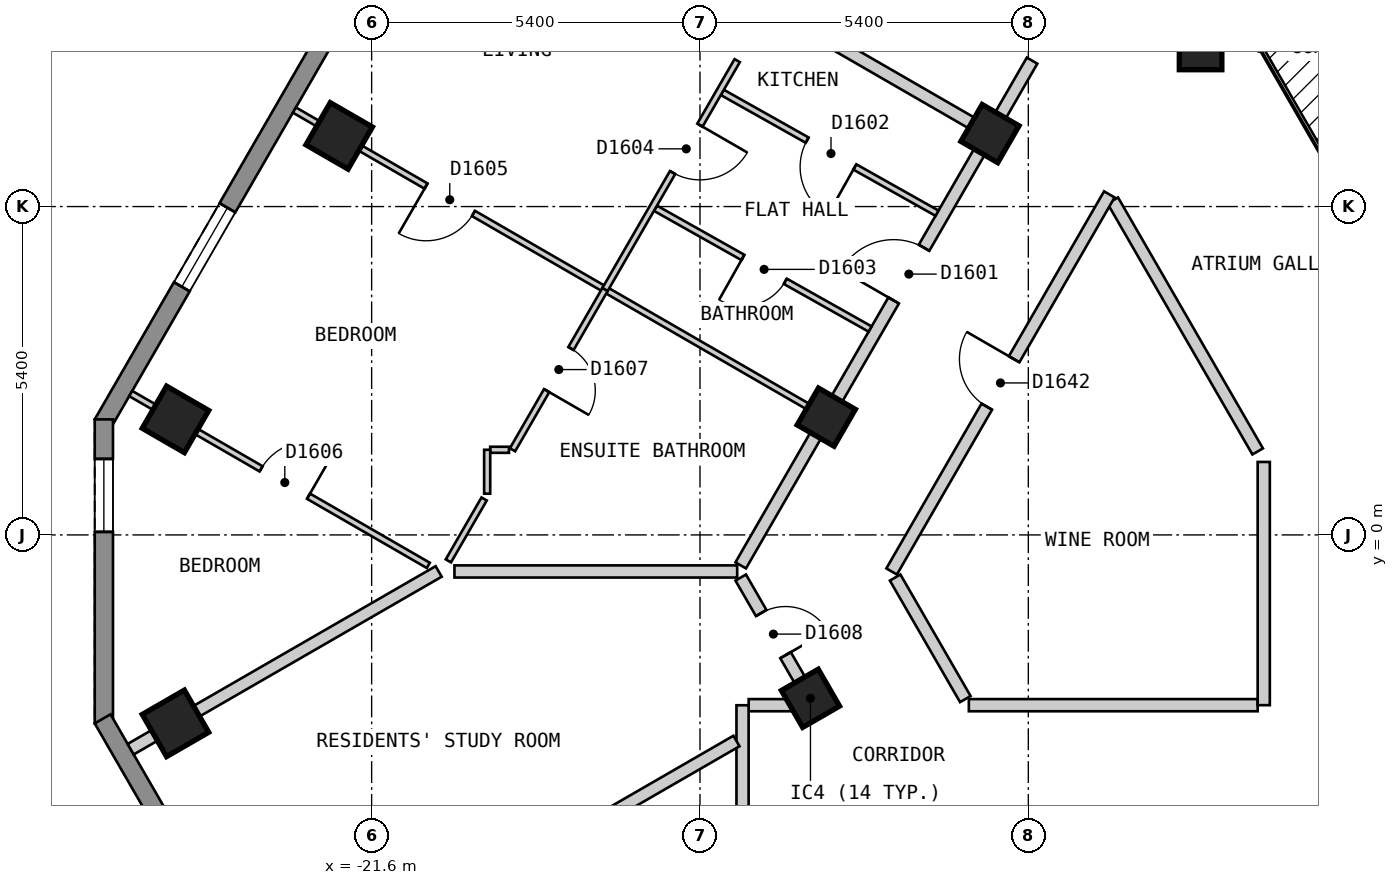
"""IFC4 building model, lengths in metres.
Left out: names, types, materials, properties, quantities, classifications, styles, units other than length and angle.
Written with IfcOpenShell. Run it as: python <this file> out.ifc"""

import sys

from ifc_helpers import new_model, si_unit, direction, frame, frame_2d, origin, origin_2d, place, context, subcontext, project, spatial, polyline, rectangle, outline, extrude, element, fill, save


model = new_model("IFC4")
c1 = context("Model", 3, precision=1e-05, world=origin(), true_north=direction((0.0, 1.0)))
c2 = subcontext(c1, "Body", "Model", "MODEL_VIEW")
j1 = project(units=[si_unit("LENGTHUNIT", "METRE"), si_unit("PLANEANGLEUNIT", "RADIAN")], contexts=[c1])
p1 = place(None, origin())
s1 = spatial("IfcSite", under=j1, at=p1, CompositionType="ELEMENT")
p2 = place(p1, origin())
s2 = spatial("IfcBuilding", under=s1, at=p2, CompositionType="ELEMENT")
p3 = place(p2, frame((0.0, 0.0, 169.2)))
s3 = spatial("IfcBuildingStorey", under=s2, at=p3, CompositionType="ELEMENT", Elevation=169.2)
for number, where, z_axis, x_axis in (
    (1, (-22.134, 6.562, 0.0), (0.0, 0.0, 1.0), (-0.5, -0.866, 0.0)),
    (2, (-24.826, 1.9, 0.0), (0.0, 0.0, 1.0), (-0.5, -0.866, 0.0)),
    (3, (-24.826, -3.099, 0.0), (0.0, 0.0, 1.0), (0.5, -0.866, 0.0)),
):
    element("IfcColumn", number, at=place(p3, frame(where, z_axis=z_axis, x_axis=x_axis)), inside=s3, PredefinedType="COLUMN", context=c2, shape_type="SweptSolid", body=[
        extrude(rectangle(XDim=0.8, YDim=0.8, at=origin_2d()), origin(), (0.0, 0.0, 1.0), 3.0),
    ])
for number, where, z_axis, x_axis in (
    (4, (-14.383, -2.687, 0.0), (0.0, 0.0, 1.0), (0.5, -0.866, 0.0)),
    (5, (-7.967, 8.0, 0.0), (0.0, 0.0, 1.0), (1.0, 0.0, 0.0)),
    (6, (-11.431, 6.6, 0.0), (0.0, 0.0, 1.0), (-0.5, -0.866, 0.0)),
    (7, (-14.123, 1.937, 0.0), (0.0, 0.0, 1.0), (-0.5, -0.866, 0.0)),
):
    element("IfcColumn", number, at=place(p3, frame(where, z_axis=z_axis, x_axis=x_axis)), inside=s3, PredefinedType="COLUMN", context=c2, shape_type="SweptSolid", body=[
        extrude(rectangle(XDim=0.7, YDim=0.7, at=origin_2d()), origin(), (0.0, 0.0, 1.0), 3.0),
    ])
p4 = place(p3, frame((-14.592, 21.625, 0.0), z_axis=(0.0, 0.0, 1.0), x_axis=(-0.500010537973, -0.866019319597, 0.0)))
e8 = element("IfcWall", 8, at=p4, inside=s3, PredefinedType="SOLIDWALL", context=c2, shape_type="SweptSolid", body=[
    extrude(outline(polyline([(0.0, -0.15), (22.863, -0.15), (22.783, 0.15), (0.08, 0.15), (0.0, -0.15)])), origin(), (0.0, 0.0, 1.0), 2.7),
])
p5 = place(p4, frame((2.606, 0.0, 0.15)))
e9 = element("IfcOpeningElement", 9, at=p5, cuts=e8, PredefinedType="OPENING", context=c2, shape_type="SweptSolid", body=[
    extrude(rectangle(XDim=1.5, YDim=2.1, at=frame_2d((0.75, 1.05))), frame((0.0, 0.16, 0.0), z_axis=(0.0, -1.0, 0.0), x_axis=(1.0, 0.0, 0.0)), (0.0, 0.0, 1.0), 0.32),
])
p6 = place(p4, frame((7.99, 0.0, 0.15)))
e10 = element("IfcOpeningElement", 10, at=p6, cuts=e8, PredefinedType="OPENING", context=c2, shape_type="SweptSolid", body=[
    extrude(rectangle(XDim=1.5, YDim=2.1, at=frame_2d((0.75, 1.05))), frame((0.0, 0.16, 0.0), z_axis=(0.0, -1.0, 0.0), x_axis=(1.0, 0.0, 0.0)), (0.0, 0.0, 1.0), 0.32),
])
p7 = place(p4, frame((13.373, 0.0, 0.15)))
e11 = element("IfcOpeningElement", 11, at=p7, cuts=e8, PredefinedType="OPENING", context=c2, shape_type="SweptSolid", body=[
    extrude(rectangle(XDim=1.5, YDim=2.1, at=frame_2d((0.75, 1.05))), frame((0.0, 0.16, 0.0), z_axis=(0.0, -1.0, 0.0), x_axis=(1.0, 0.0, 0.0)), (0.0, 0.0, 1.0), 0.32),
])
p8 = place(p4, frame((18.758, 0.0, 0.15)))
e12 = element("IfcOpeningElement", 12, at=p8, cuts=e8, PredefinedType="OPENING", context=c2, shape_type="SweptSolid", body=[
    extrude(rectangle(XDim=1.5, YDim=2.1, at=frame_2d((0.75, 1.05))), frame((0.0, 0.16, 0.0), z_axis=(0.0, -1.0, 0.0), x_axis=(1.0, 0.0, 0.0)), (0.0, 0.0, 1.0), 0.32),
])
p9 = place(p3, frame((-26.004, 1.9, 0.0), z_axis=(0.0, 0.0, 1.0), x_axis=(0.0, -1.0, 0.0)))
e13 = element("IfcWall", 13, at=p9, inside=s3, PredefinedType="SOLIDWALL", context=c2, shape_type="SweptSolid", body=[
    extrude(outline(polyline([(0.0, -0.15), (5.0, -0.15), (4.92, 0.15), (0.08, 0.15), (0.0, -0.15)])), origin(), (0.0, 0.0, 1.0), 2.7),
])
p10 = place(p9, frame((0.65, 0.0, 0.15)))
e14 = element("IfcOpeningElement", 14, at=p10, cuts=e13, PredefinedType="OPENING", context=c2, shape_type="SweptSolid", body=[
    extrude(rectangle(XDim=1.2, YDim=2.1, at=frame_2d((0.6, 1.05))), frame((0.0, 0.16, 0.0), z_axis=(0.0, -1.0, 0.0), x_axis=(1.0, 0.0, 0.0)), (0.0, 0.0, 1.0), 0.32),
])
p11 = place(p3, frame((-26.024, -3.025, 0.0), z_axis=(0.0, 0.0, 1.0), x_axis=(0.500018670445, -0.86601462413, 0.0)))
e15 = element("IfcWall", 15, at=p11, inside=s3, PredefinedType="SOLIDWALL", context=c2, shape_type="SweptSolid", body=[
    extrude(outline(polyline([(0.0, -0.15), (20.785, -0.15), (20.705, 0.15), (0.08, 0.15), (0.0, -0.15)])), origin(), (0.0, 0.0, 1.0), 2.7),
])
p12 = place(p11, frame((2.346, 0.0, 0.15)))
e16 = element("IfcOpeningElement", 16, at=p12, cuts=e15, PredefinedType="OPENING", context=c2, shape_type="SweptSolid", body=[
    extrude(rectangle(XDim=1.5, YDim=2.1, at=frame_2d((0.75, 1.05))), frame((0.0, 0.16, 0.0), z_axis=(0.0, -1.0, 0.0), x_axis=(1.0, 0.0, 0.0)), (0.0, 0.0, 1.0), 0.32),
])
p13 = place(p11, frame((7.21, 0.0, 0.15)))
e17 = element("IfcOpeningElement", 17, at=p13, cuts=e15, PredefinedType="OPENING", context=c2, shape_type="SweptSolid", body=[
    extrude(rectangle(XDim=1.5, YDim=2.1, at=frame_2d((0.75, 1.05))), frame((0.0, 0.16, 0.0), z_axis=(0.0, -1.0, 0.0), x_axis=(1.0, 0.0, 0.0)), (0.0, 0.0, 1.0), 0.32),
])
p14 = place(p11, frame((12.073, 0.0, 0.15)))
e18 = element("IfcOpeningElement", 18, at=p14, cuts=e15, PredefinedType="OPENING", context=c2, shape_type="SweptSolid", body=[
    extrude(rectangle(XDim=1.5, YDim=2.1, at=frame_2d((0.75, 1.05))), frame((0.0, 0.16, 0.0), z_axis=(0.0, -1.0, 0.0), x_axis=(1.0, 0.0, 0.0)), (0.0, 0.0, 1.0), 0.32),
])
p15 = place(p11, frame((16.938, 0.0, 0.15)))
e19 = element("IfcOpeningElement", 19, at=p15, cuts=e15, PredefinedType="OPENING", context=c2, shape_type="SweptSolid", body=[
    extrude(rectangle(XDim=1.5, YDim=2.1, at=frame_2d((0.75, 1.05))), frame((0.0, 0.16, 0.0), z_axis=(0.0, -1.0, 0.0), x_axis=(1.0, 0.0, 0.0)), (0.0, 0.0, 1.0), 0.32),
])
p16 = place(p3, frame((-9.411, 5.5, 0.0), z_axis=(0.0, 0.0, 1.0), x_axis=(0.500018099276, -0.86601495391, 0.0)))
e20 = element("IfcWall", 20, at=p16, inside=s3, PredefinedType="PARTITIONING", context=c2, shape_type="SweptSolid", body=[
    extrude(rectangle(XDim=4.765, YDim=0.2, at=frame_2d((2.383, 0.0))), origin(), (0.0, 0.0, 1.0), 2.7),
])
p17 = place(p3, frame((-12.99, -0.701, 0.0), z_axis=(0.0, 0.0, 1.0), x_axis=(0.499972710878, -0.866041158593, 0.0)))
e21 = element("IfcWall", 21, at=p17, inside=s3, PredefinedType="PARTITIONING", context=c2, shape_type="SweptSolid", body=[
    extrude(rectangle(XDim=2.308, YDim=0.2, at=frame_2d((1.154, 0.0))), origin(), (0.0, 0.0, 1.0), 2.7),
])
p18 = place(p3, frame((-15.53, -0.701, 0.0), z_axis=(0.0, 0.0, 1.0), x_axis=(0.499972710878, -0.866041158593, 0.0)))
e22 = element("IfcWall", 22, at=p18, inside=s3, PredefinedType="PARTITIONING", context=c2, shape_type="SweptSolid", body=[
    extrude(rectangle(XDim=2.308, YDim=0.2, at=frame_2d((1.154, 0.0))), origin(), (0.0, 0.0, 1.0), 2.7),
])
p19 = place(p18, frame((0.674, 0.0, 0.0)))
e23 = element("IfcOpeningElement", 23, at=p19, cuts=e22, PredefinedType="OPENING", context=c2, shape_type="SweptSolid", body=[
    extrude(rectangle(XDim=0.8, YDim=2.1, at=frame_2d((0.4, 1.05))), frame((0.0, 0.11, 0.0), z_axis=(0.0, -1.0, 0.0), x_axis=(1.0, 0.0, 0.0)), (0.0, 0.0, 1.0), 0.22),
])
p20 = place(p3, frame((-15.399, -2.8, 0.0), z_axis=(0.0, 0.0, 1.0), x_axis=(1.0, 0.0, 0.0)))
e24 = element("IfcWall", 24, at=p20, inside=s3, PredefinedType="PARTITIONING", context=c2, shape_type="SweptSolid", body=[
    extrude(rectangle(XDim=1.081, YDim=0.2, at=frame_2d((0.541, 0.0))), origin(), (0.0, 0.0, 1.0), 2.7),
])
p21 = place(p3, frame((-11.778, -2.8, 0.0), z_axis=(0.0, 0.0, 1.0), x_axis=(1.0, 0.0, 0.0)))
e25 = element("IfcWall", 25, at=p21, inside=s3, PredefinedType="PARTITIONING", context=c2, shape_type="SweptSolid", body=[
    extrude(rectangle(XDim=4.75, YDim=0.2, at=frame_2d((2.375, 0.0))), origin(), (0.0, 0.0, 1.0), 2.7),
])
p22 = place(p3, frame((-13.048, -0.601, 0.0), z_axis=(0.0, 0.0, 1.0), x_axis=(0.499982180423, 0.866035691677, 0.0)))
e26 = element("IfcWall", 26, at=p22, inside=s3, PredefinedType="PARTITIONING", context=c2, shape_type="SweptSolid", body=[
    extrude(rectangle(XDim=7.16, YDim=0.2, at=frame_2d((3.58, 0.0))), origin(), (0.0, 0.0, 1.0), 2.7),
])
p23 = place(p22, frame((3.13, 0.0, 0.0)))
e27 = element("IfcOpeningElement", 27, at=p23, cuts=e26, PredefinedType="OPENING", context=c2, shape_type="SweptSolid", body=[
    extrude(rectangle(XDim=0.9, YDim=2.1, at=frame_2d((0.45, 1.05))), frame((0.0, 0.11, 0.0), z_axis=(0.0, -1.0, 0.0), x_axis=(1.0, 0.0, 0.0)), (0.0, 0.0, 1.0), 0.22),
])
p24 = place(p3, frame((-15.53, -0.501, 0.0), z_axis=(0.0, 0.0, 1.0), x_axis=(0.499952498232, 0.866052827206, 0.0)))
e28 = element("IfcWall", 28, at=p24, inside=s3, PredefinedType="PARTITIONING", context=c2, shape_type="SweptSolid", body=[
    extrude(rectangle(XDim=9.585, YDim=0.2, at=frame_2d((4.792, 0.0))), origin(), (0.0, 0.0, 1.0), 2.7),
])
p25 = place(p24, frame((5.031, 0.0, 0.0)))
e29 = element("IfcOpeningElement", 29, at=p25, cuts=e28, PredefinedType="OPENING", context=c2, shape_type="SweptSolid", body=[
    extrude(rectangle(XDim=1.0, YDim=2.1, at=frame_2d((0.5, 1.05))), frame((0.0, 0.11, 0.0), z_axis=(0.0, -1.0, 0.0), x_axis=(1.0, 0.0, 0.0)), (0.0, 0.0, 1.0), 0.22),
])
p26 = place(p3, frame((-6.928, -2.8, 0.0), z_axis=(0.0, 0.0, 1.0), x_axis=(0.0, 1.0, 0.0)))
e30 = element("IfcWall", 30, at=p26, inside=s3, PredefinedType="PARTITIONING", context=c2, shape_type="SweptSolid", body=[
    extrude(rectangle(XDim=4.0, YDim=0.2, at=frame_2d((2.0, 0.0))), origin(), (0.0, 0.0, 1.0), 2.7),
])
p27 = place(p3, frame((-15.5, -6.6, 0.0), z_axis=(0.0, 0.0, 1.0), x_axis=(0.0, 1.0, 0.0)))
e31 = element("IfcWall", 31, at=p27, inside=s3, PredefinedType="PARTITIONING", context=c2, shape_type="SweptSolid", body=[
    extrude(rectangle(XDim=3.799, YDim=0.2, at=frame_2d((1.899, 0.0))), origin(), (0.0, 0.0, 1.0), 2.7),
])
p28 = place(p3, frame((-16.932, 5.372, 0.0), z_axis=(0.0, 0.0, 1.0), x_axis=(0.871514356952, -0.490369988505, 0.0)))
e32 = element("IfcWall", 32, at=p28, inside=s3, PredefinedType="PARTITIONING", context=c2, shape_type="SweptSolid", body=[
    extrude(rectangle(XDim=4.05, YDim=0.1, at=frame_2d((2.025, 0.0))), origin(), (0.0, 0.0, 1.0), 2.7),
])
p29 = place(p28, frame((1.65, 0.0, 0.0)))
e33 = element("IfcOpeningElement", 33, at=p29, cuts=e32, PredefinedType="OPENING", context=c2, shape_type="SweptSolid", body=[
    extrude(rectangle(XDim=0.8, YDim=2.1, at=frame_2d((0.4, 1.05))), frame((0.0, 0.06, 0.0), z_axis=(0.0, -1.0, 0.0), x_axis=(1.0, 0.0, 0.0)), (0.0, 0.0, 1.0), 0.12),
])
p30 = place(p3, frame((-15.832, 7.277, 0.0), z_axis=(0.0, 0.0, 1.0), x_axis=(0.871528850672, -0.490344228523, 0.0)))
e34 = element("IfcWall", 34, at=p30, inside=s3, PredefinedType="PARTITIONING", context=c2, shape_type="SweptSolid", body=[
    extrude(rectangle(XDim=4.05, YDim=0.1, at=frame_2d((2.025, 0.0))), origin(), (0.0, 0.0, 1.0), 2.7),
])
p31 = place(p30, frame((1.6, 0.0, 0.0)))
e35 = element("IfcOpeningElement", 35, at=p31, cuts=e34, PredefinedType="OPENING", context=c2, shape_type="SweptSolid", body=[
    extrude(rectangle(XDim=0.9, YDim=2.1, at=frame_2d((0.45, 1.05))), frame((0.0, 0.06, 0.0), z_axis=(0.0, -1.0, 0.0), x_axis=(1.0, 0.0, 0.0)), (0.0, 0.0, 1.0), 0.12),
])
p32 = place(p3, frame((-22.87, 6.987, 0.0), z_axis=(0.0, 0.0, 1.0), x_axis=(0.866022959057, -0.500004234368, 0.0)))
e36 = element("IfcWall", 36, at=p32, inside=s3, PredefinedType="PARTITIONING", context=c2, shape_type="SweptSolid", body=[
    extrude(rectangle(XDim=10.0, YDim=0.1, at=frame_2d((5.0, 0.0))), origin(), (0.0, 0.0, 1.0), 2.7),
])
p33 = place(p32, frame((2.5, 0.0, 0.0)))
e37 = element("IfcOpeningElement", 37, at=p33, cuts=e36, PredefinedType="OPENING", context=c2, shape_type="SweptSolid", body=[
    extrude(rectangle(XDim=0.9, YDim=2.1, at=frame_2d((0.45, 1.05))), frame((0.0, 0.06, 0.0), z_axis=(0.0, -1.0, 0.0), x_axis=(1.0, 0.0, 0.0)), (0.0, 0.0, 1.0), 0.12),
])
p34 = place(p3, frame((-25.562, 2.325, 0.0), z_axis=(0.0, 0.0, 1.0), x_axis=(0.865998530728, -0.500046542611, 0.0)))
e38 = element("IfcWall", 38, at=p34, inside=s3, PredefinedType="PARTITIONING", context=c2, shape_type="SweptSolid", body=[
    extrude(rectangle(XDim=5.651, YDim=0.1, at=frame_2d((2.826, 0.0))), origin(), (0.0, 0.0, 1.0), 2.7),
])
p35 = place(p34, frame((2.476, 0.0, 0.0)))
e39 = element("IfcOpeningElement", 39, at=p35, cuts=e38, PredefinedType="OPENING", context=c2, shape_type="SweptSolid", body=[
    extrude(rectangle(XDim=0.9, YDim=2.1, at=frame_2d((0.45, 1.05))), frame((0.0, 0.06, 0.0), z_axis=(0.0, -1.0, 0.0), x_axis=(1.0, 0.0, 0.0)), (0.0, 0.0, 1.0), 0.12),
])
p36 = place(p3, frame((-19.65, 1.4, 0.0), z_axis=(0.0, 0.0, 1.0), x_axis=(1.0, 0.0, 0.0)))
e40 = element("IfcWall", 40, at=p36, inside=s3, PredefinedType="PARTITIONING", context=c2, shape_type="SweptSolid", body=[
    extrude(rectangle(XDim=0.309, YDim=0.1, at=frame_2d((0.154, 0.0))), origin(), (0.0, 0.0, 1.0), 2.7),
])
p37 = place(p3, frame((-20.338, -0.427, 0.0), z_axis=(0.0, 0.0, 1.0), x_axis=(0.500069990121, 0.865984991198, 0.0)))
e41 = element("IfcWall", 41, at=p37, inside=s3, PredefinedType="PARTITIONING", context=c2, shape_type="SweptSolid", body=[
    extrude(rectangle(XDim=1.176, YDim=0.1, at=frame_2d((0.588, 0.0))), origin(), (0.0, 0.0, 1.0), 2.7),
])
p38 = place(p3, frame((-19.283, 1.4, 0.0), z_axis=(0.0, 0.0, 1.0), x_axis=(0.499847391584, 0.866113494368, 0.0)))
e42 = element("IfcWall", 42, at=p38, inside=s3, PredefinedType="PARTITIONING", context=c2, shape_type="SweptSolid", body=[
    extrude(rectangle(XDim=3.045, YDim=0.1, at=frame_2d((1.522, 0.0))), origin(), (0.0, 0.0, 1.0), 2.7),
])
p39 = place(p38, frame((1.123, 0.0, 0.0)))
e43 = element("IfcOpeningElement", 43, at=p39, cuts=e42, PredefinedType="OPENING", context=c2, shape_type="SweptSolid", body=[
    extrude(rectangle(XDim=0.8, YDim=2.1, at=frame_2d((0.4, 1.05))), frame((0.0, 0.06, 0.0), z_axis=(0.0, -1.0, 0.0), x_axis=(1.0, 0.0, 0.0)), (0.0, 0.0, 1.0), 0.12),
])
p40 = place(p3, frame((-19.7, 0.678, 0.0), z_axis=(0.0, 0.0, 1.0), x_axis=(0.0, 1.0, 0.0)))
e44 = element("IfcWall", 44, at=p40, inside=s3, PredefinedType="PARTITIONING", context=c2, shape_type="SweptSolid", body=[
    extrude(rectangle(XDim=0.722, YDim=0.1, at=frame_2d((0.361, 0.0))), origin(), (0.0, 0.0, 1.0), 2.7),
])
p41 = place(p3, frame((-20.178, 11.65, 0.0), z_axis=(0.0, 0.0, 1.0), x_axis=(0.866016855193, -0.500014806302, 0.0)))
e45 = element("IfcWall", 45, at=p41, inside=s3, PredefinedType="PARTITIONING", context=c2, shape_type="SweptSolid", body=[
    extrude(rectangle(XDim=10.0, YDim=0.2, at=frame_2d((5.0, 0.0))), origin(), (0.0, 0.0, 1.0), 2.7),
])
p42 = place(p3, frame((-20.238, -0.601, 0.0), z_axis=(0.0, 0.0, 1.0), x_axis=(1.0, 0.0, 0.0)))
e46 = element("IfcWall", 46, at=p42, inside=s3, PredefinedType="PARTITIONING", context=c2, shape_type="SweptSolid", body=[
    extrude(rectangle(XDim=4.65, YDim=0.2, at=frame_2d((2.325, 0.0))), origin(), (0.0, 0.0, 1.0), 2.7),
])
p43 = place(p3, frame((-23.13, -7.737, 0.0), z_axis=(0.0, 0.0, 1.0), x_axis=(0.86598451299, 0.500070818246, 0.0)))
e47 = element("IfcWall", 47, at=p43, inside=s3, PredefinedType="PARTITIONING", context=c2, shape_type="SweptSolid", body=[
    extrude(rectangle(XDim=8.695, YDim=0.2, at=frame_2d((4.348, 0.0))), origin(), (0.0, 0.0, 1.0), 2.7),
])
p44 = place(p3, frame((-25.563, -3.524, 0.0), z_axis=(0.0, 0.0, 1.0), x_axis=(0.866128586522, 0.499821239653, 0.0)))
e48 = element("IfcWall", 48, at=p44, inside=s3, PredefinedType="PARTITIONING", context=c2, shape_type="SweptSolid", body=[
    extrude(rectangle(XDim=5.848, YDim=0.2, at=frame_2d((2.924, 0.0))), origin(), (0.0, 0.0, 1.0), 2.7),
])
p45 = place(p3, frame((-17.761, 4.037, 0.0), z_axis=(0.0, 0.0, 1.0), x_axis=(0.50009692756, 0.865969435399, 0.0)))
e49 = element("IfcWall", 49, at=p45, inside=s3, PredefinedType="PARTITIONING", context=c2, shape_type="SweptSolid", body=[
    extrude(rectangle(XDim=4.345, YDim=0.1, at=frame_2d((2.173, 0.0))), origin(), (0.0, 0.0, 1.0), 2.7),
])
p46 = place(p45, frame((2.22, 0.0, 0.0)))
e50 = element("IfcOpeningElement", 50, at=p46, cuts=e49, PredefinedType="OPENING", context=c2, shape_type="SweptSolid", body=[
    extrude(rectangle(XDim=0.9, YDim=2.1, at=frame_2d((0.45, 1.05))), frame((0.0, 0.06, 0.0), z_axis=(0.0, -1.0, 0.0), x_axis=(1.0, 0.0, 0.0)), (0.0, 0.0, 1.0), 0.12),
])
p47 = place(p8, origin())
e51 = element("IfcWindow", 51, at=p47, inside=s3, PartitioningType="SINGLE_PANEL", PredefinedType="WINDOW", context=c2, shape_type="SweptSolid", body=[
    extrude(rectangle(XDim=1.5, YDim=2.1, at=frame_2d((0.75, 1.05))), frame((0.0, 0.03, 0.0), z_axis=(0.0, -1.0, 0.0), x_axis=(1.0, 0.0, 0.0)), (0.0, 0.0, 1.0), 0.06),
])
fill(e12, e51)
p48 = place(p10, origin())
e52 = element("IfcWindow", 52, at=p48, inside=s3, PartitioningType="SINGLE_PANEL", PredefinedType="WINDOW", context=c2, shape_type="SweptSolid", body=[
    extrude(rectangle(XDim=1.2, YDim=2.1, at=frame_2d((0.6, 1.05))), frame((0.0, 0.03, 0.0), z_axis=(0.0, -1.0, 0.0), x_axis=(1.0, 0.0, 0.0)), (0.0, 0.0, 1.0), 0.06),
])
fill(e14, e52)
p49 = place(p25, origin())
e53 = element("IfcDoor", 53, at=p49, inside=s3, OperationType="SINGLE_SWING_LEFT", PredefinedType="DOOR", context=c2, shape_type="SweptSolid", body=[
    extrude(rectangle(XDim=1.0, YDim=2.1, at=frame_2d((0.5, 1.05))), frame((0.0, 0.025, 0.0), z_axis=(0.0, -1.0, 0.0), x_axis=(1.0, 0.0, 0.0)), (0.0, 0.0, 1.0), 0.05),
])
fill(e29, e53)
p50 = place(p31, origin())
e54 = element("IfcDoor", 54, at=p50, inside=s3, OperationType="SINGLE_SWING_RIGHT", PredefinedType="DOOR", context=c2, shape_type="SweptSolid", body=[
    extrude(rectangle(XDim=0.9, YDim=2.1, at=frame_2d((0.45, 1.05))), frame((0.0, 0.025, 0.0), z_axis=(0.0, -1.0, 0.0), x_axis=(1.0, 0.0, 0.0)), (0.0, 0.0, 1.0), 0.05),
])
fill(e35, e54)
p51 = place(p29, origin())
e55 = element("IfcDoor", 55, at=p51, inside=s3, OperationType="SINGLE_SWING_LEFT", PredefinedType="DOOR", context=c2, shape_type="SweptSolid", body=[
    extrude(rectangle(XDim=0.8, YDim=2.1, at=frame_2d((0.4, 1.05))), frame((0.0, 0.025, 0.0), z_axis=(0.0, -1.0, 0.0), x_axis=(1.0, 0.0, 0.0)), (0.0, 0.0, 1.0), 0.05),
])
fill(e33, e55)
p52 = place(p46, origin())
e56 = element("IfcDoor", 56, at=p52, inside=s3, OperationType="SINGLE_SWING_RIGHT", PredefinedType="DOOR", context=c2, shape_type="SweptSolid", body=[
    extrude(rectangle(XDim=0.9, YDim=2.1, at=frame_2d((0.45, 1.05))), frame((0.0, 0.025, 0.0), z_axis=(0.0, -1.0, 0.0), x_axis=(1.0, 0.0, 0.0)), (0.0, 0.0, 1.0), 0.05),
])
fill(e50, e56)
p53 = place(p33, origin())
e57 = element("IfcDoor", 57, at=p53, inside=s3, OperationType="SINGLE_SWING_LEFT", PredefinedType="DOOR", context=c2, shape_type="SweptSolid", body=[
    extrude(rectangle(XDim=0.9, YDim=2.1, at=frame_2d((0.45, 1.05))), frame((0.0, 0.025, 0.0), z_axis=(0.0, -1.0, 0.0), x_axis=(1.0, 0.0, 0.0)), (0.0, 0.0, 1.0), 0.05),
])
fill(e37, e57)
p54 = place(p35, origin())
e58 = element("IfcDoor", 58, at=p54, inside=s3, OperationType="SINGLE_SWING_RIGHT", PredefinedType="DOOR", context=c2, shape_type="SweptSolid", body=[
    extrude(rectangle(XDim=0.9, YDim=2.1, at=frame_2d((0.45, 1.05))), frame((0.0, 0.025, 0.0), z_axis=(0.0, -1.0, 0.0), x_axis=(1.0, 0.0, 0.0)), (0.0, 0.0, 1.0), 0.05),
])
fill(e39, e58)
p55 = place(p39, origin())
e59 = element("IfcDoor", 59, at=p55, inside=s3, OperationType="SINGLE_SWING_LEFT", PredefinedType="DOOR", context=c2, shape_type="SweptSolid", body=[
    extrude(rectangle(XDim=0.8, YDim=2.1, at=frame_2d((0.4, 1.05))), frame((0.0, 0.025, 0.0), z_axis=(0.0, -1.0, 0.0), x_axis=(1.0, 0.0, 0.0)), (0.0, 0.0, 1.0), 0.05),
])
fill(e43, e59)
p56 = place(p19, origin())
e60 = element("IfcDoor", 60, at=p56, inside=s3, OperationType="SINGLE_SWING_RIGHT", PredefinedType="DOOR", context=c2, shape_type="SweptSolid", body=[
    extrude(rectangle(XDim=0.8, YDim=2.1, at=frame_2d((0.4, 1.05))), frame((0.0, 0.025, 0.0), z_axis=(0.0, -1.0, 0.0), x_axis=(1.0, 0.0, 0.0)), (0.0, 0.0, 1.0), 0.05),
])
fill(e23, e60)
p57 = place(p23, origin())
e61 = element("IfcDoor", 61, at=p57, inside=s3, OperationType="SINGLE_SWING_RIGHT", PredefinedType="DOOR", context=c2, shape_type="SweptSolid", body=[
    extrude(rectangle(XDim=0.9, YDim=2.1, at=frame_2d((0.45, 1.05))), frame((0.0, 0.025, 0.0), z_axis=(0.0, -1.0, 0.0), x_axis=(1.0, 0.0, 0.0)), (0.0, 0.0, 1.0), 0.05),
])
fill(e27, e61)
save(model, sys.argv[1])
